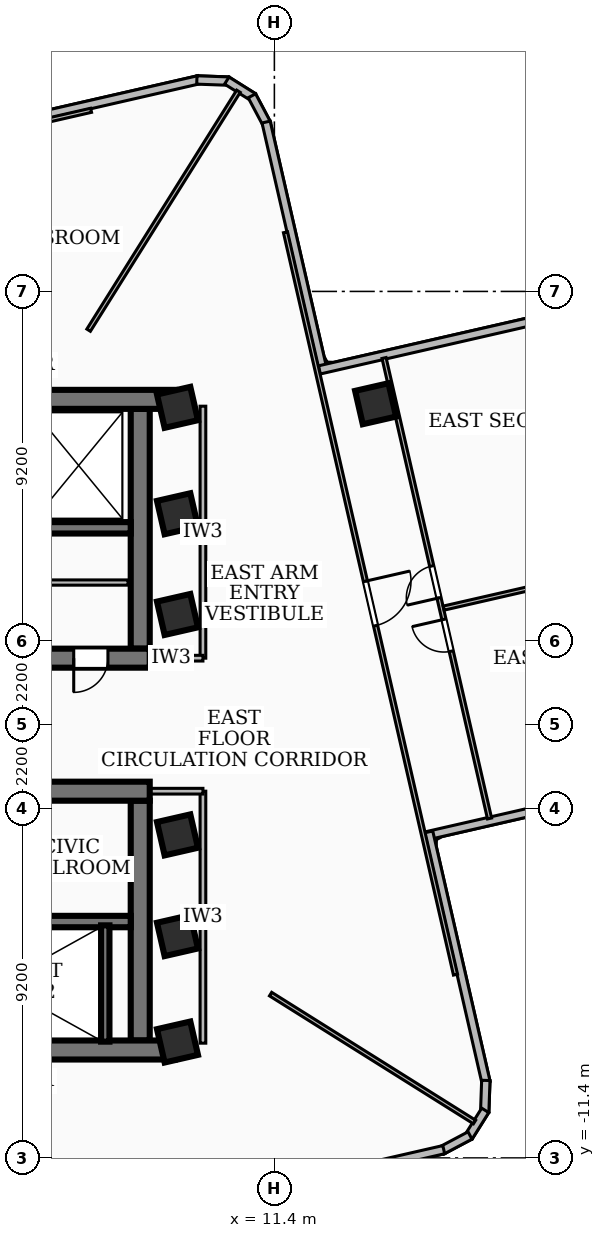
"""IFC4 building model, lengths in metres.
Left out: names, types, materials, properties, quantities, classifications, styles, units other than length and angle.
Written with IfcOpenShell. Run it as: python <this file> out.ifc"""

import sys

from ifc_helpers import new_model, si_unit, direction, frame, frame_2d, origin, origin_2d, place, context, subcontext, project, spatial, rectangle, extrude, element, fill, save


model = new_model("IFC4")
c1 = context("Model", 3, precision=1e-05, world=origin(), true_north=direction((0.0, 1.0)))
c2 = subcontext(c1, "Body", "Model", "MODEL_VIEW")
j1 = project(units=[si_unit("LENGTHUNIT", "METRE"), si_unit("PLANEANGLEUNIT", "RADIAN")], contexts=[c1])
p1 = place(None, origin())
s1 = spatial("IfcSite", under=j1, at=p1, CompositionType="ELEMENT")
p2 = place(p1, origin())
s2 = spatial("IfcBuilding", under=s1, at=p2, CompositionType="ELEMENT")
p3 = place(p2, frame((0.0, 0.0, 123.48)))
s3 = spatial("IfcBuildingStorey", under=s2, at=p3, CompositionType="ELEMENT", Elevation=123.48)
p4 = place(p3, frame((-8.78, 8.56, 0.0), z_axis=(0.0, 0.0, 1.0), x_axis=(1.0, 0.0, 0.0)))
e1 = element("IfcWall", 1, at=p4, inside=s3, PredefinedType="SHEAR", context=c2, shape_type="SweptSolid", body=[
    extrude(rectangle(XDim=17.56, YDim=0.5, at=frame_2d((8.78, 0.0))), origin(), (0.0, 0.0, 1.0), 3.34),
])
p5 = place(p3, frame((8.12, 1.75, 0.0), z_axis=(0.0, 0.0, 1.0), x_axis=(-1.0, 0.0, 0.0)))
e2 = element("IfcWall", 2, at=p5, inside=s3, PredefinedType="SHEAR", context=c2, shape_type="SweptSolid", body=[
    extrude(rectangle(XDim=16.24, YDim=0.5, at=frame_2d((8.12, 0.0))), origin(), (0.0, 0.0, 1.0), 3.34),
])
p6 = place(p5, frame((7.45, 0.0, 0.0)))
e3 = element("IfcOpeningElement", 3, at=p6, cuts=e2, PredefinedType="OPENING", context=c2, shape_type="SweptSolid", body=[
    extrude(rectangle(XDim=1.0, YDim=2.1, at=frame_2d((0.5, 1.05))), frame((0.0, 0.26, 0.0), z_axis=(0.0, -1.0, 0.0), x_axis=(1.0, 0.0, 0.0)), (0.0, 0.0, 1.0), 0.52),
])
p7 = place(p5, frame((3.4, 0.0, 0.0)))
e4 = element("IfcOpeningElement", 4, at=p7, cuts=e2, PredefinedType="OPENING", context=c2, shape_type="SweptSolid", body=[
    extrude(rectangle(XDim=0.9, YDim=2.06, at=frame_2d((0.45, 1.03))), frame((0.0, 0.26, 0.0), z_axis=(0.0, -1.0, 0.0), x_axis=(1.0, 0.0, 0.0)), (0.0, 0.0, 1.0), 0.52),
])
p8 = place(p5, frame((1.1, 0.0, 0.0)))
e5 = element("IfcOpeningElement", 5, at=p8, cuts=e2, PredefinedType="OPENING", context=c2, shape_type="SweptSolid", body=[
    extrude(rectangle(XDim=0.9, YDim=2.06, at=frame_2d((0.45, 1.03))), frame((0.0, 0.26, 0.0), z_axis=(0.0, -1.0, 0.0), x_axis=(1.0, 0.0, 0.0)), (0.0, 0.0, 1.0), 0.52),
])
p9 = place(p3, frame((7.87, 8.31, 0.0), z_axis=(0.0, 0.0, 1.0), x_axis=(0.0, -1.0, 0.0)))
e6 = element("IfcWall", 6, at=p9, inside=s3, PredefinedType="SHEAR", context=c2, shape_type="SweptSolid", body=[
    extrude(rectangle(XDim=6.31, YDim=0.5, at=frame_2d((3.155, 0.0))), origin(), (0.0, 0.0, 1.0), 3.34),
])
p10 = place(p3, frame((7.62, 5.18, 0.0), z_axis=(0.0, 0.0, 1.0), x_axis=(-1.0, 0.0, 0.0)))
e7 = element("IfcWall", 7, at=p10, inside=s3, PredefinedType="SOLIDWALL", context=c2, shape_type="SweptSolid", body=[
    extrude(rectangle(XDim=15.24, YDim=0.3, at=frame_2d((7.62, 0.0))), origin(), (0.0, 0.0, 1.0), 3.34),
])
p11 = place(p10, frame((5.77, 0.0, 0.0)))
e8 = element("IfcOpeningElement", 8, at=p11, cuts=e7, PredefinedType="OPENING", context=c2, shape_type="SweptSolid", body=[
    extrude(rectangle(XDim=1.1, YDim=2.15, at=frame_2d((0.55, 1.075))), frame((0.0, 0.16, 0.0), z_axis=(0.0, -1.0, 0.0), x_axis=(1.0, 0.0, 0.0)), (0.0, 0.0, 1.0), 0.32),
])
p12 = place(p10, frame((2.97, 0.0, 0.0)))
e9 = element("IfcOpeningElement", 9, at=p12, cuts=e7, PredefinedType="OPENING", context=c2, shape_type="SweptSolid", body=[
    extrude(rectangle(XDim=1.1, YDim=2.15, at=frame_2d((0.55, 1.075))), frame((0.0, 0.16, 0.0), z_axis=(0.0, -1.0, 0.0), x_axis=(1.0, 0.0, 0.0)), (0.0, 0.0, 1.0), 0.32),
])
p13 = place(p10, frame((7.97, 0.0, 0.0)))
e10 = element("IfcOpeningElement", 10, at=p13, cuts=e7, PredefinedType="OPENING", context=c2, shape_type="SweptSolid", body=[
    extrude(rectangle(XDim=1.0, YDim=2.1, at=frame_2d((0.5, 1.05))), frame((0.0, 0.16, 0.0), z_axis=(0.0, -1.0, 0.0), x_axis=(1.0, 0.0, 0.0)), (0.0, 0.0, 1.0), 0.32),
])
p14 = place(p3, frame((8.78, -8.56, 0.0), z_axis=(0.0, 0.0, 1.0), x_axis=(-1.0, 0.0, 0.0)))
e11 = element("IfcWall", 11, at=p14, inside=s3, PredefinedType="SHEAR", context=c2, shape_type="SweptSolid", body=[
    extrude(rectangle(XDim=17.56, YDim=0.5, at=frame_2d((8.78, 0.0))), origin(), (0.0, 0.0, 1.0), 3.34),
])
p15 = place(p3, frame((-8.12, -1.75, 0.0), z_axis=(0.0, 0.0, 1.0), x_axis=(1.0, 0.0, 0.0)))
e12 = element("IfcWall", 12, at=p15, inside=s3, PredefinedType="SHEAR", context=c2, shape_type="SweptSolid", body=[
    extrude(rectangle(XDim=16.24, YDim=0.5, at=frame_2d((8.12, 0.0))), origin(), (0.0, 0.0, 1.0), 3.34),
])
p16 = place(p15, frame((7.45, 0.0, 0.0)))
e13 = element("IfcOpeningElement", 13, at=p16, cuts=e12, PredefinedType="OPENING", context=c2, shape_type="SweptSolid", body=[
    extrude(rectangle(XDim=1.0, YDim=2.1, at=frame_2d((0.5, 1.05))), frame((0.0, 0.26, 0.0), z_axis=(0.0, -1.0, 0.0), x_axis=(1.0, 0.0, 0.0)), (0.0, 0.0, 1.0), 0.52),
])
p17 = place(p15, frame((12.65, 0.0, 0.0)))
e14 = element("IfcOpeningElement", 14, at=p17, cuts=e12, PredefinedType="OPENING", context=c2, shape_type="SweptSolid", body=[
    extrude(rectangle(XDim=0.9, YDim=2.06, at=frame_2d((0.45, 1.03))), frame((0.0, 0.26, 0.0), z_axis=(0.0, -1.0, 0.0), x_axis=(1.0, 0.0, 0.0)), (0.0, 0.0, 1.0), 0.52),
])
p18 = place(p15, frame((0.565, 0.0, 0.0)))
e15 = element("IfcOpeningElement", 15, at=p18, cuts=e12, PredefinedType="OPENING", context=c2, shape_type="SweptSolid", body=[
    extrude(rectangle(XDim=1.05, YDim=2.15, at=frame_2d((0.525, 1.075))), frame((0.0, 0.26, 0.0), z_axis=(0.0, -1.0, 0.0), x_axis=(1.0, 0.0, 0.0)), (0.0, 0.0, 1.0), 0.52),
])
p19 = place(p15, frame((2.125, 0.0, 0.0)))
e16 = element("IfcOpeningElement", 16, at=p19, cuts=e12, PredefinedType="OPENING", context=c2, shape_type="SweptSolid", body=[
    extrude(rectangle(XDim=1.05, YDim=2.15, at=frame_2d((0.525, 1.075))), frame((0.0, 0.26, 0.0), z_axis=(0.0, -1.0, 0.0), x_axis=(1.0, 0.0, 0.0)), (0.0, 0.0, 1.0), 0.52),
])
p20 = place(p15, frame((3.685, 0.0, 0.0)))
e17 = element("IfcOpeningElement", 17, at=p20, cuts=e12, PredefinedType="OPENING", context=c2, shape_type="SweptSolid", body=[
    extrude(rectangle(XDim=1.05, YDim=2.15, at=frame_2d((0.525, 1.075))), frame((0.0, 0.26, 0.0), z_axis=(0.0, -1.0, 0.0), x_axis=(1.0, 0.0, 0.0)), (0.0, 0.0, 1.0), 0.52),
])
p21 = place(p3, frame((7.87, -2.0, 0.0), z_axis=(0.0, 0.0, 1.0), x_axis=(0.0, -1.0, 0.0)))
e18 = element("IfcWall", 18, at=p21, inside=s3, PredefinedType="SHEAR", context=c2, shape_type="SweptSolid", body=[
    extrude(rectangle(XDim=6.31, YDim=0.5, at=frame_2d((3.155, 0.0))), origin(), (0.0, 0.0, 1.0), 3.34),
])
p22 = place(p3, frame((-7.62, -5.18, 0.0), z_axis=(0.0, 0.0, 1.0), x_axis=(1.0, 0.0, 0.0)))
e19 = element("IfcWall", 19, at=p22, inside=s3, PredefinedType="SOLIDWALL", context=c2, shape_type="SweptSolid", body=[
    extrude(rectangle(XDim=15.24, YDim=0.3, at=frame_2d((7.62, 0.0))), origin(), (0.0, 0.0, 1.0), 3.34),
])
p23 = place(p22, frame((5.77, 0.0, 0.0)))
e20 = element("IfcOpeningElement", 20, at=p23, cuts=e19, PredefinedType="OPENING", context=c2, shape_type="SweptSolid", body=[
    extrude(rectangle(XDim=1.1, YDim=2.15, at=frame_2d((0.55, 1.075))), frame((0.0, 0.16, 0.0), z_axis=(0.0, -1.0, 0.0), x_axis=(1.0, 0.0, 0.0)), (0.0, 0.0, 1.0), 0.32),
])
p24 = place(p22, frame((7.97, 0.0, 0.0)))
e21 = element("IfcOpeningElement", 21, at=p24, cuts=e19, PredefinedType="OPENING", context=c2, shape_type="SweptSolid", body=[
    extrude(rectangle(XDim=1.0, YDim=2.1, at=frame_2d((0.5, 1.05))), frame((0.0, 0.16, 0.0), z_axis=(0.0, -1.0, 0.0), x_axis=(1.0, 0.0, 0.0)), (0.0, 0.0, 1.0), 0.32),
])
p25 = place(p3, frame((6.95, -8.34, 0.0), z_axis=(0.0, 0.0, 1.0), x_axis=(0.0, 1.0, 0.0)))
e22 = element("IfcWall", 22, at=p25, inside=s3, PredefinedType="SOLIDWALL", context=c2, shape_type="SweptSolid", body=[
    extrude(rectangle(XDim=3.06, YDim=0.22, at=frame_2d((1.53, 0.0))), origin(), (0.0, 0.0, 1.0), 3.34),
])
for number, where, z_axis, x_axis in (
    (23, (8.85, -5.55, 0.0), (0.0, 0.0, 1.0), (0.975, 0.223, 0.0)),
    (24, (8.85, -2.9, 0.0), (0.0, 0.0, 1.0), (0.975, 0.223, 0.0)),
    (25, (8.85, 2.9, 0.0), (0.0, 0.0, 1.0), (0.975, 0.223, 0.0)),
    (26, (8.85, 5.55, 0.0), (0.0, 0.0, 1.0), (0.975, 0.223, 0.0)),
    (27, (8.85, -8.35, 0.0), (0.0, 0.0, 1.0), (0.975, 0.223, 0.0)),
    (28, (8.85, 8.35, 0.0), (0.0, 0.0, 1.0), (0.975, 0.223, 0.0)),
    (29, (14.064, 8.445, 0.0), (0.0, 0.0, 1.0), (0.975, 0.223, 0.0)),
):
    element("IfcColumn", number, at=place(p3, frame(where, z_axis=z_axis, x_axis=x_axis)), inside=s3, PredefinedType="COLUMN", context=c2, shape_type="SweptSolid", body=[
        extrude(rectangle(XDim=0.9, YDim=0.9, at=origin_2d()), origin(), (0.0, 0.0, 1.0), 3.6),
    ])
p26 = place(p3, frame((2.821, 15.46, 0.0), z_axis=(0.0, 0.0, 1.0), x_axis=(0.974754598481, 0.223278912438, 0.0)))
e30 = element("IfcWall", 30, at=p26, inside=s3, PredefinedType="SOLIDWALL", context=c2, shape_type="SweptSolid", body=[
    extrude(rectangle(XDim=6.759, YDim=0.22, at=frame_2d((3.379, 0.0))), origin(), (0.0, 0.0, 1.0), 2.57),
])
p27 = place(p3, frame((9.36, 16.964, 0.0), z_axis=(0.0, 0.0, 1.0), x_axis=(0.999352376715, -0.035983706773, 0.0)))
e31 = element("IfcWall", 31, at=p27, inside=s3, PredefinedType="SOLIDWALL", context=c2, shape_type="SweptSolid", body=[
    extrude(rectangle(XDim=0.834, YDim=0.22, at=frame_2d((0.417, 0.0))), origin(), (0.0, 0.0, 1.0), 3.34),
])
p28 = place(p3, frame((10.148, 16.948, 0.0), z_axis=(0.0, 0.0, 1.0), x_axis=(0.847311109497, -0.531096868492, 0.0)))
e32 = element("IfcWall", 32, at=p28, inside=s3, PredefinedType="SOLIDWALL", context=c2, shape_type="SweptSolid", body=[
    extrude(rectangle(XDim=0.819, YDim=0.22, at=frame_2d((0.41, 0.0))), origin(), (0.0, 0.0, 1.0), 3.34),
])
p29 = place(p3, frame((10.809, 16.548, 0.0), z_axis=(0.0, 0.0, 1.0), x_axis=(0.468506090516, -0.883460266876, 0.0)))
e33 = element("IfcWall", 33, at=p29, inside=s3, PredefinedType="SOLIDWALL", context=c2, shape_type="SweptSolid", body=[
    extrude(rectangle(XDim=0.834, YDim=0.22, at=frame_2d((0.417, 0.0))), origin(), (0.0, 0.0, 1.0), 3.34),
])
p30 = place(p3, frame((11.182, 15.857, 0.0), z_axis=(0.0, 0.0, 1.0), x_axis=(0.223278912438, -0.974754598481, 0.0)))
e34 = element("IfcWall", 34, at=p30, inside=s3, PredefinedType="SOLIDWALL", context=c2, shape_type="SweptSolid", body=[
    extrude(rectangle(XDim=6.759, YDim=0.22, at=frame_2d((3.379, 0.0))), origin(), (0.0, 0.0, 1.0), 2.644),
])
p31 = place(p3, frame((12.585, 9.335, 0.0), z_axis=(0.0, 0.0, 1.0), x_axis=(0.974754036658, 0.223281365141, 0.0)))
e35 = element("IfcWall", 35, at=p31, inside=s3, PredefinedType="SOLIDWALL", context=c2, shape_type="SweptSolid", body=[
    extrude(rectangle(XDim=13.459, YDim=0.22, at=frame_2d((6.729, 0.0))), origin(), (0.0, 0.0, 1.0), 2.644),
])
p32 = place(p3, frame((28.512, 0.078, 0.0), z_axis=(0.0, 0.0, 1.0), x_axis=(-0.974753462872, -0.223283870038, 0.0)))
e36 = element("IfcWall", 36, at=p32, inside=s3, PredefinedType="SOLIDWALL", context=c2, shape_type="SweptSolid", body=[
    extrude(rectangle(XDim=13.458, YDim=0.22, at=frame_2d((6.729, 0.0))), origin(), (0.0, 0.0, 1.0), 3.34),
])
p33 = place(p32, frame((1.1, 0.0, 0.85)))
e37 = element("IfcOpeningElement", 37, at=p33, cuts=e36, PredefinedType="OPENING", context=c2, shape_type="SweptSolid", body=[
    extrude(rectangle(XDim=1.8, YDim=1.8, at=frame_2d((0.9, 0.9))), frame((0.0, 0.12, 0.0), z_axis=(0.0, -1.0, 0.0), x_axis=(1.0, 0.0, 0.0)), (0.0, 0.0, 1.0), 0.24),
])
p34 = place(p3, frame((15.46, -2.821, 0.0), z_axis=(0.0, 0.0, 1.0), x_axis=(0.223278912438, -0.974754598481, 0.0)))
e38 = element("IfcWall", 38, at=p34, inside=s3, PredefinedType="SOLIDWALL", context=c2, shape_type="SweptSolid", body=[
    extrude(rectangle(XDim=6.759, YDim=0.22, at=frame_2d((3.379, 0.0))), origin(), (0.0, 0.0, 1.0), 3.34),
])
p35 = place(p3, frame((16.964, -9.36, 0.0), z_axis=(0.0, 0.0, 1.0), x_axis=(-0.035983706773, -0.999352376715, 0.0)))
e39 = element("IfcWall", 39, at=p35, inside=s3, PredefinedType="SOLIDWALL", context=c2, shape_type="SweptSolid", body=[
    extrude(rectangle(XDim=0.834, YDim=0.22, at=frame_2d((0.417, 0.0))), origin(), (0.0, 0.0, 1.0), 3.34),
])
p36 = place(p3, frame((16.948, -10.148, 0.0), z_axis=(0.0, 0.0, 1.0), x_axis=(-0.531096868492, -0.847311109497, 0.0)))
e40 = element("IfcWall", 40, at=p36, inside=s3, PredefinedType="SOLIDWALL", context=c2, shape_type="SweptSolid", body=[
    extrude(rectangle(XDim=0.819, YDim=0.22, at=frame_2d((0.41, 0.0))), origin(), (0.0, 0.0, 1.0), 3.34),
])
p37 = place(p3, frame((16.548, -10.809, 0.0), z_axis=(0.0, 0.0, 1.0), x_axis=(-0.883460266876, -0.468506090516, 0.0)))
e41 = element("IfcWall", 41, at=p37, inside=s3, PredefinedType="SOLIDWALL", context=c2, shape_type="SweptSolid", body=[
    extrude(rectangle(XDim=0.834, YDim=0.22, at=frame_2d((0.417, 0.0))), origin(), (0.0, 0.0, 1.0), 3.34),
])
p38 = place(p3, frame((15.857, -11.182, 0.0), z_axis=(0.0, 0.0, 1.0), x_axis=(-0.974754598481, -0.223278912438, 0.0)))
e42 = element("IfcWall", 42, at=p38, inside=s3, PredefinedType="SOLIDWALL", context=c2, shape_type="SweptSolid", body=[
    extrude(rectangle(XDim=6.759, YDim=0.22, at=frame_2d((3.379, 0.0))), origin(), (0.0, 0.0, 1.0), 3.34),
])
p39 = place(p3, frame((2.9, 3.74, 0.0), z_axis=(0.0, 0.0, 1.0), x_axis=(1.0, 0.0, 0.0)))
e43 = element("IfcWall", 43, at=p39, inside=s3, PredefinedType="PARTITIONING", context=c2, shape_type="SweptSolid", body=[
    extrude(rectangle(XDim=4.65, YDim=0.138, at=frame_2d((2.325, 0.0))), origin(), (0.0, 0.0, 1.0), 3.34),
])
p40 = place(p3, frame((9.52, 1.75, 0.0), z_axis=(0.0, 0.0, 1.0), x_axis=(0.0, 1.0, 0.0)))
e44 = element("IfcWall", 44, at=p40, inside=s3, PredefinedType="PARTITIONING", context=c2, shape_type="SweptSolid", body=[
    extrude(rectangle(XDim=6.63, YDim=0.15, at=frame_2d((3.315, 0.0))), origin(), (0.0, 0.0, 1.0), 2.57),
])
p41 = place(p3, frame((7.85, 1.75, 0.0), z_axis=(0.0, 0.0, 1.0), x_axis=(1.0, 0.0, 0.0)))
e45 = element("IfcWall", 45, at=p41, inside=s3, PredefinedType="PARTITIONING", context=c2, shape_type="SweptSolid", body=[
    extrude(rectangle(XDim=1.67, YDim=0.15, at=frame_2d((0.835, 0.0))), origin(), (0.0, 0.0, 1.0), 2.57),
])
p42 = place(p3, frame((9.52, -8.38, 0.0), z_axis=(0.0, 0.0, 1.0), x_axis=(0.0, 1.0, 0.0)))
e46 = element("IfcWall", 46, at=p42, inside=s3, PredefinedType="PARTITIONING", context=c2, shape_type="SweptSolid", body=[
    extrude(rectangle(XDim=6.63, YDim=0.15, at=frame_2d((3.315, 0.0))), origin(), (0.0, 0.0, 1.0), 2.57),
])
p43 = place(p3, frame((7.85, -1.75, 0.0), z_axis=(0.0, 0.0, 1.0), x_axis=(1.0, 0.0, 0.0)))
e47 = element("IfcWall", 47, at=p43, inside=s3, PredefinedType="PARTITIONING", context=c2, shape_type="SweptSolid", body=[
    extrude(rectangle(XDim=1.67, YDim=0.15, at=frame_2d((0.835, 0.0))), origin(), (0.0, 0.0, 1.0), 2.57),
])
p44 = place(p3, frame((6.512, 10.38, 0.0), z_axis=(0.0, 0.0, 1.0), x_axis=(0.531323053356, 0.847169294163, 0.0)))
e48 = element("IfcWall", 48, at=p44, inside=s3, PredefinedType="PARTITIONING", context=c2, shape_type="SweptSolid", body=[
    extrude(rectangle(XDim=7.421, YDim=0.11, at=frame_2d((3.711, 0.0))), origin(), (0.0, 0.0, 1.0), 2.57),
])
p45 = place(p3, frame((11.3, -7.089, 0.0), z_axis=(0.0, 0.0, 1.0), x_axis=(0.847172398776, -0.531318103167, 0.0)))
e49 = element("IfcWall", 49, at=p45, inside=s3, PredefinedType="PARTITIONING", context=c2, shape_type="SweptSolid", body=[
    extrude(rectangle(XDim=6.335, YDim=0.11, at=frame_2d((3.167, 0.0))), origin(), (0.0, 0.0, 1.0), 3.34),
])
p46 = place(p3, frame((11.692, 12.957, 0.0), z_axis=(0.0, 0.0, 1.0), x_axis=(0.223262093598, -0.97475845088, 0.0)))
e50 = element("IfcWall", 50, at=p46, inside=s3, PredefinedType="PARTITIONING", context=c2, shape_type="SweptSolid", body=[
    extrude(rectangle(XDim=20.04, YDim=0.11, at=frame_2d((10.02, 0.0))), origin(), (0.0, 0.0, 1.0), 2.57),
])
p47 = place(p46, frame((9.42, 0.0, 0.0)))
e51 = element("IfcOpeningElement", 51, at=p47, cuts=e50, PredefinedType="OPENING", context=c2, shape_type="SweptSolid", body=[
    extrude(rectangle(XDim=1.2, YDim=2.1, at=frame_2d((0.6, 1.05))), frame((0.0, 0.065, 0.0), z_axis=(0.0, -1.0, 0.0), x_axis=(1.0, 0.0, 0.0)), (0.0, 0.0, 1.0), 0.13),
])
p48 = place(p3, frame((15.855, 3.067, 0.0), z_axis=(0.0, 0.0, 1.0), x_axis=(0.974758398925, 0.223262320434, 0.0)))
e52 = element("IfcWall", 52, at=p48, inside=s3, PredefinedType="PARTITIONING", context=c2, shape_type="SweptSolid", body=[
    extrude(rectangle(XDim=13.075, YDim=0.11, at=frame_2d((6.538, 0.0))), origin(), (0.0, 0.0, 1.0), 2.72),
])
p49 = place(p3, frame((17.062, -2.468, 0.0), z_axis=(0.0, 0.0, 1.0), x_axis=(-0.223341555051, 0.974740247341, 0.0)))
e53 = element("IfcWall", 53, at=p49, inside=s3, PredefinedType="PARTITIONING", context=c2, shape_type="SweptSolid", body=[
    extrude(rectangle(XDim=12.43, YDim=0.11, at=frame_2d((6.215, 0.0))), origin(), (0.0, 0.0, 1.0), 2.57),
])
p50 = place(p49, frame((4.515, 0.0, 0.0)))
e54 = element("IfcOpeningElement", 54, at=p50, cuts=e53, PredefinedType="OPENING", context=c2, shape_type="SweptSolid", body=[
    extrude(rectangle(XDim=0.86, YDim=2.04, at=frame_2d((0.43, 1.02))), frame((0.0, 0.065, 0.0), z_axis=(0.0, -1.0, 0.0), x_axis=(1.0, 0.0, 0.0)), (0.0, 0.0, 1.0), 0.13),
])
p51 = place(p49, frame((5.955, 0.0, 0.0)))
e55 = element("IfcOpeningElement", 55, at=p51, cuts=e53, PredefinedType="OPENING", context=c2, shape_type="SweptSolid", body=[
    extrude(rectangle(XDim=0.86, YDim=2.04, at=frame_2d((0.43, 1.02))), frame((0.0, 0.065, 0.0), z_axis=(0.0, -1.0, 0.0), x_axis=(1.0, 0.0, 0.0)), (0.0, 0.0, 1.0), 0.13),
])
p52 = place(p3, frame((-12.957, 11.692, 0.0), z_axis=(0.0, 0.0, 1.0), x_axis=(0.97475845088, 0.223262093598, 0.0)))
e56 = element("IfcWall", 56, at=p52, inside=s3, PredefinedType="PARTITIONING", context=c2, shape_type="SweptSolid", body=[
    extrude(rectangle(XDim=20.04, YDim=0.11, at=frame_2d((10.02, 0.0))), origin(), (0.0, 0.0, 1.0), 2.57),
])
p53 = place(p52, frame((9.42, 0.0, 0.0)))
e57 = element("IfcOpeningElement", 57, at=p53, cuts=e56, PredefinedType="OPENING", context=c2, shape_type="SweptSolid", body=[
    extrude(rectangle(XDim=1.2, YDim=2.1, at=frame_2d((0.6, 1.05))), frame((0.0, 0.065, 0.0), z_axis=(0.0, -1.0, 0.0), x_axis=(1.0, 0.0, 0.0)), (0.0, 0.0, 1.0), 0.13),
])
p54 = place(p8, origin())
e58 = element("IfcDoor", 58, at=p54, inside=s3, OperationType="SINGLE_SWING_RIGHT", PredefinedType="DOOR", context=c2, shape_type="SweptSolid", body=[
    extrude(rectangle(XDim=0.9, YDim=2.06, at=frame_2d((0.45, 1.03))), frame((0.0, 0.025, 0.0), z_axis=(0.0, -1.0, 0.0), x_axis=(1.0, 0.0, 0.0)), (0.0, 0.0, 1.0), 0.05),
])
fill(e5, e58)
p55 = place(p47, origin())
e59 = element("IfcDoor", 59, at=p55, inside=s3, OperationType="SINGLE_SWING_LEFT", PredefinedType="DOOR", context=c2, shape_type="SweptSolid", body=[
    extrude(rectangle(XDim=1.2, YDim=2.1, at=frame_2d((0.6, 1.05))), frame((0.0, 0.025, 0.0), z_axis=(0.0, -1.0, 0.0), x_axis=(1.0, 0.0, 0.0)), (0.0, 0.0, 1.0), 0.05),
])
fill(e51, e59)
p56 = place(p50, origin())
e60 = element("IfcDoor", 60, at=p56, inside=s3, OperationType="SINGLE_SWING_RIGHT", PredefinedType="DOOR", context=c2, shape_type="SweptSolid", body=[
    extrude(rectangle(XDim=0.86, YDim=2.04, at=frame_2d((0.43, 1.02))), frame((0.0, 0.025, 0.0), z_axis=(0.0, -1.0, 0.0), x_axis=(1.0, 0.0, 0.0)), (0.0, 0.0, 1.0), 0.05),
])
fill(e54, e60)
p57 = place(p51, origin())
e61 = element("IfcDoor", 61, at=p57, inside=s3, OperationType="SINGLE_SWING_LEFT", PredefinedType="DOOR", context=c2, shape_type="SweptSolid", body=[
    extrude(rectangle(XDim=0.86, YDim=2.04, at=frame_2d((0.43, 1.02))), frame((0.0, 0.025, 0.0), z_axis=(0.0, -1.0, 0.0), x_axis=(1.0, 0.0, 0.0)), (0.0, 0.0, 1.0), 0.05),
])
fill(e55, e61)
save(model, sys.argv[1])
